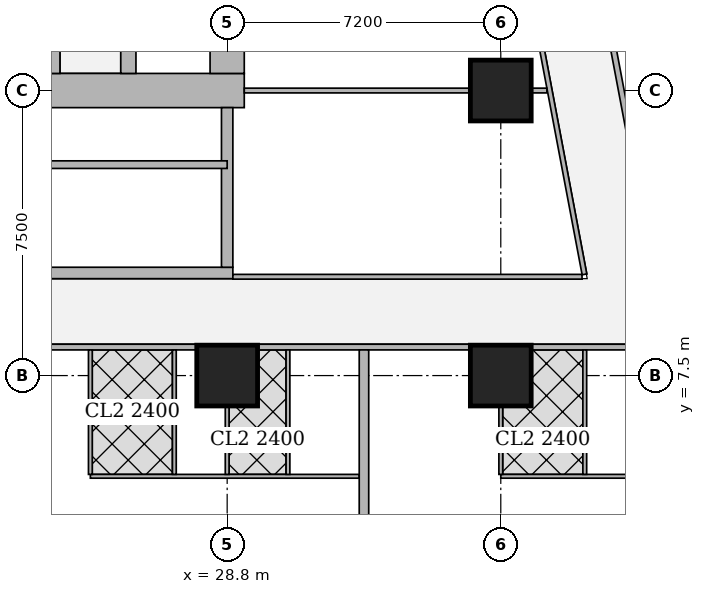
"""IFC4 building model, lengths in metres.
Left out: names, types, materials, properties, quantities, classifications, styles, units other than length and angle.
Written with IfcOpenShell. Run it as: python <this file> out.ifc"""

import sys

from ifc_helpers import new_model, si_unit, direction, frame, frame_2d, origin, origin_2d, place, context, subcontext, project, spatial, rectangle, extrude, element, fill, save


model = new_model("IFC4")
c1 = context("Model", 3, precision=1e-05, world=origin(), true_north=direction((0.0, 1.0)))
c2 = subcontext(c1, "Body", "Model", "MODEL_VIEW")
j1 = project(units=[si_unit("LENGTHUNIT", "METRE"), si_unit("PLANEANGLEUNIT", "RADIAN")], contexts=[c1])
p1 = place(None, origin())
s1 = spatial("IfcSite", under=j1, at=p1, CompositionType="ELEMENT")
p2 = place(p1, origin())
s2 = spatial("IfcBuilding", under=s1, at=p2, CompositionType="ELEMENT")
p3 = place(p2, frame((0.0, 0.0, 100.4)))
s3 = spatial("IfcBuildingStorey", under=s2, at=p3, CompositionType="ELEMENT", Elevation=100.4)
for number, where, z_axis, x_axis in (
    (1, (28.8, 7.5, 0.0), (0.0, 0.0, 1.0), (1.0, 0.0, 0.0)),
    (2, (36.0, 7.5, 0.0), (0.0, 0.0, 1.0), (1.0, 0.0, 0.0)),
    (3, (36.0, 15.0, 0.0), (0.0, 0.0, 1.0), (1.0, 0.0, 0.0)),
):
    element("IfcColumn", number, at=place(p3, frame(where, z_axis=z_axis, x_axis=x_axis)), inside=s3, PredefinedType="COLUMN", context=c2, shape_type="SweptSolid", body=[
        extrude(rectangle(XDim=1.6, YDim=1.6, at=origin_2d()), origin(), (0.0, 0.0, 1.0), 3.75),
    ])
p4 = place(p3, frame((13.95, 15.0, 0.0), z_axis=(0.0, 0.0, 1.0), x_axis=(1.0, 0.0, 0.0)))
e4 = element("IfcWall", 4, at=p4, inside=s3, PredefinedType="SHEAR", context=c2, shape_type="SweptSolid", body=[
    extrude(rectangle(XDim=15.3, YDim=0.9, at=frame_2d((7.65, 0.0))), origin(), (0.0, 0.0, 1.0), 3.75),
])
p5 = place(p4, frame((4.45, 0.0, 0.0)))
e5 = element("IfcOpeningElement", 5, at=p5, cuts=e4, PredefinedType="OPENING", context=c2, shape_type="SweptSolid", body=[
    extrude(rectangle(XDim=1.8, YDim=2.1, at=frame_2d((0.9, 1.05))), frame((0.0, 0.46, 0.0), z_axis=(0.0, -1.0, 0.0), x_axis=(1.0, 0.0, 0.0)), (0.0, 0.0, 1.0), 0.92),
])
p6 = place(p4, frame((10.7, 0.0, 0.0)))
e6 = element("IfcOpeningElement", 6, at=p6, cuts=e4, PredefinedType="OPENING", context=c2, shape_type="SweptSolid", body=[
    extrude(rectangle(XDim=1.1, YDim=2.1, at=frame_2d((0.55, 1.05))), frame((0.0, 0.46, 0.0), z_axis=(0.0, -1.0, 0.0), x_axis=(1.0, 0.0, 0.0)), (0.0, 0.0, 1.0), 0.92),
])
p7 = place(p3, frame((28.8, 15.45, 0.0), z_axis=(0.0, 0.0, 1.0), x_axis=(0.0, 1.0, 0.0)))
e7 = element("IfcWall", 7, at=p7, inside=s3, PredefinedType="SHEAR", context=c2, shape_type="SweptSolid", body=[
    extrude(rectangle(XDim=14.1, YDim=0.9, at=frame_2d((7.05, 0.0))), origin(), (0.0, 0.0, 1.0), 3.75),
])
p8 = place(p3, frame((24.2, 15.45, 0.0), z_axis=(0.0, 0.0, 1.0), x_axis=(0.0, 1.0, 0.0)))
e8 = element("IfcWall", 8, at=p8, inside=s3, PredefinedType="SHEAR", context=c2, shape_type="SweptSolid", body=[
    extrude(rectangle(XDim=14.1, YDim=0.4, at=frame_2d((7.05, 0.0))), origin(), (0.0, 0.0, 1.0), 3.75),
])
p9 = place(p3, frame((26.2, 15.45, 0.0), z_axis=(0.0, 0.0, 1.0), x_axis=(0.0, 1.0, 0.0)))
e9 = element("IfcWall", 9, at=p9, inside=s3, PredefinedType="SHEAR", context=c2, shape_type="SweptSolid", body=[
    extrude(rectangle(XDim=3.1, YDim=0.4, at=frame_2d((1.55, 0.0))), origin(), (0.0, 0.0, 1.0), 3.75),
])
p10 = place(p9, frame((0.825, 0.0, 0.0)))
e10 = element("IfcOpeningElement", 10, at=p10, cuts=e9, PredefinedType="OPENING", context=c2, shape_type="SweptSolid", body=[
    extrude(rectangle(XDim=1.2, YDim=2.1, at=frame_2d((0.6, 1.05))), frame((0.0, 0.21, 0.0), z_axis=(0.0, -1.0, 0.0), x_axis=(1.0, 0.0, 0.0)), (0.0, 0.0, 1.0), 0.42),
])
p11 = place(p3, frame((21.45, 10.2, 0.0), z_axis=(0.0, 0.0, 1.0), x_axis=(1.0, 0.0, 0.0)))
e11 = element("IfcWall", 11, at=p11, inside=s3, PredefinedType="SHEAR", context=c2, shape_type="SweptSolid", body=[
    extrude(rectangle(XDim=7.5, YDim=0.3, at=frame_2d((3.75, 0.0))), origin(), (0.0, 0.0, 1.0), 3.75),
])
p12 = place(p11, frame((0.5, 0.0, 0.0)))
e12 = element("IfcOpeningElement", 12, at=p12, cuts=e11, PredefinedType="OPENING", context=c2, shape_type="SweptSolid", body=[
    extrude(rectangle(XDim=1.1, YDim=2.1, at=frame_2d((0.55, 1.05))), frame((0.0, 0.16, 0.0), z_axis=(0.0, -1.0, 0.0), x_axis=(1.0, 0.0, 0.0)), (0.0, 0.0, 1.0), 0.32),
])
p13 = place(p3, frame((28.8, 10.35, 0.0), z_axis=(0.0, 0.0, 1.0), x_axis=(0.0, 1.0, 0.0)))
e13 = element("IfcWall", 13, at=p13, inside=s3, PredefinedType="SHEAR", context=c2, shape_type="SweptSolid", body=[
    extrude(rectangle(XDim=4.2, YDim=0.3, at=frame_2d((2.1, 0.0))), origin(), (0.0, 0.0, 1.0), 3.75),
])
p14 = place(p3, frame((40.356, 8.25, 0.0), z_axis=(0.0, 0.0, 1.0), x_axis=(-1.0, 0.0, 0.0)))
e14 = element("IfcWall", 14, at=p14, inside=s3, PredefinedType="SOLIDWALL", context=c2, shape_type="SweptSolid", body=[
    extrude(rectangle(XDim=3.555, YDim=0.15, at=frame_2d((1.777, 0.0))), origin(), (0.0, 0.0, 1.0), 3.5),
])
p15 = place(p3, frame((35.199, 8.25, 0.0), z_axis=(0.0, 0.0, 1.0), x_axis=(-1.0, 0.0, 0.0)))
e15 = element("IfcWall", 15, at=p15, inside=s3, PredefinedType="SOLIDWALL", context=c2, shape_type="SweptSolid", body=[
    extrude(rectangle(XDim=5.598, YDim=0.15, at=frame_2d((2.799, 0.0))), origin(), (0.0, 0.0, 1.0), 3.5),
])
p16 = place(p15, frame((0.699, 0.0, 0.0)))
e16 = element("IfcOpeningElement", 16, at=p16, cuts=e15, PredefinedType="OPENING", context=c2, shape_type="SweptSolid", body=[
    extrude(rectangle(XDim=1.0, YDim=2.1, at=frame_2d((0.5, 1.05))), frame((0.0, 0.085, 0.0), z_axis=(0.0, -1.0, 0.0), x_axis=(1.0, 0.0, 0.0)), (0.0, 0.0, 1.0), 0.17),
])
p17 = place(p3, frame((27.999, 8.25, 0.0), z_axis=(0.0, 0.0, 1.0), x_axis=(-1.0, 0.0, 0.0)))
e17 = element("IfcWall", 17, at=p17, inside=s3, PredefinedType="SOLIDWALL", context=c2, shape_type="SweptSolid", body=[
    extrude(rectangle(XDim=5.598, YDim=0.15, at=frame_2d((2.799, 0.0))), origin(), (0.0, 0.0, 1.0), 3.5),
])
p18 = place(p17, frame((3.899, 0.0, 0.0)))
e18 = element("IfcOpeningElement", 18, at=p18, cuts=e17, PredefinedType="OPENING", context=c2, shape_type="SweptSolid", body=[
    extrude(rectangle(XDim=1.0, YDim=2.1, at=frame_2d((0.5, 1.05))), frame((0.0, 0.085, 0.0), z_axis=(0.0, -1.0, 0.0), x_axis=(1.0, 0.0, 0.0)), (0.0, 0.0, 1.0), 0.17),
])
p19 = place(p3, frame((33.382, 45.65, 0.0), z_axis=(0.0, 0.0, 1.0), x_axis=(0.185593544777, -0.982626600565, 0.0)))
e19 = element("IfcWall", 19, at=p19, inside=s3, PredefinedType="SOLIDWALL", context=c2, shape_type="SweptSolid", body=[
    extrude(rectangle(XDim=47.118, YDim=0.15, at=frame_2d((23.559, 0.0))), origin(), (0.0, 0.0, 1.0), 2.2),
])
p20 = place(p19, frame((10.662, 0.0, 0.0)))
e20 = element("IfcOpeningElement", 20, at=p20, cuts=e19, PredefinedType="OPENING", context=c2, shape_type="SweptSolid", body=[
    extrude(rectangle(XDim=1.0, YDim=2.1, at=frame_2d((0.5, 1.05))), frame((0.0, 0.085, 0.0), z_axis=(0.0, -1.0, 0.0), x_axis=(1.0, 0.0, 0.0)), (0.0, 0.0, 1.0), 0.17),
])
p21 = place(p19, frame((15.237, 0.0, 0.0)))
e21 = element("IfcOpeningElement", 21, at=p21, cuts=e19, PredefinedType="OPENING", context=c2, shape_type="SweptSolid", body=[
    extrude(rectangle(XDim=1.0, YDim=2.1, at=frame_2d((0.5, 1.05))), frame((0.0, 0.085, 0.0), z_axis=(0.0, -1.0, 0.0), x_axis=(1.0, 0.0, 0.0)), (0.0, 0.0, 1.0), 0.17),
])
p22 = place(p19, frame((27.341, 0.0, 0.0)))
e22 = element("IfcOpeningElement", 22, at=p22, cuts=e19, PredefinedType="OPENING", context=c2, shape_type="SweptSolid", body=[
    extrude(rectangle(XDim=1.0, YDim=2.1, at=frame_2d((0.5, 1.05))), frame((0.0, 0.085, 0.0), z_axis=(0.0, -1.0, 0.0), x_axis=(1.0, 0.0, 0.0)), (0.0, 0.0, 1.0), 0.17),
])
p23 = place(p19, frame((33.833, 0.0, 0.0)))
e23 = element("IfcOpeningElement", 23, at=p23, cuts=e19, PredefinedType="OPENING", context=c2, shape_type="SweptSolid", body=[
    extrude(rectangle(XDim=1.0, YDim=2.1, at=frame_2d((0.5, 1.05))), frame((0.0, 0.085, 0.0), z_axis=(0.0, -1.0, 0.0), x_axis=(1.0, 0.0, 0.0)), (0.0, 0.0, 1.0), 0.17),
])
p24 = place(p3, frame((32.275, 4.85, 0.0), z_axis=(0.0, 0.0, 1.0), x_axis=(-1.0, 0.0, 0.0)))
e24 = element("IfcWall", 24, at=p24, inside=s3, PredefinedType="PARTITIONING", context=c2, shape_type="SweptSolid", body=[
    extrude(rectangle(XDim=7.075, YDim=0.1, at=frame_2d((3.538, 0.0))), origin(), (0.0, 0.0, 1.0), 3.5),
])
p25 = place(p24, frame((5.52, 0.0, 0.0)))
e25 = element("IfcOpeningElement", 25, at=p25, cuts=e24, PredefinedType="OPENING", context=c2, shape_type="SweptSolid", body=[
    extrude(rectangle(XDim=0.9, YDim=2.1, at=frame_2d((0.45, 1.05))), frame((0.0, 0.06, 0.0), z_axis=(0.0, -1.0, 0.0), x_axis=(1.0, 0.0, 0.0)), (0.0, 0.0, 1.0), 0.12),
])
p26 = place(p24, frame((2.225, 0.0, 0.0)))
e26 = element("IfcOpeningElement", 26, at=p26, cuts=e24, PredefinedType="OPENING", context=c2, shape_type="SweptSolid", body=[
    extrude(rectangle(XDim=0.9, YDim=2.1, at=frame_2d((0.45, 1.05))), frame((0.0, 0.06, 0.0), z_axis=(0.0, -1.0, 0.0), x_axis=(1.0, 0.0, 0.0)), (0.0, 0.0, 1.0), 0.12),
])
p27 = place(p24, frame((3.72, 0.0, 0.0)))
e27 = element("IfcOpeningElement", 27, at=p27, cuts=e24, PredefinedType="OPENING", context=c2, shape_type="SweptSolid", body=[
    extrude(rectangle(XDim=0.9, YDim=2.1, at=frame_2d((0.45, 1.05))), frame((0.0, 0.06, 0.0), z_axis=(0.0, -1.0, 0.0), x_axis=(1.0, 0.0, 0.0)), (0.0, 0.0, 1.0), 0.12),
])
p28 = place(p24, frame((0.425, 0.0, 0.0)))
e28 = element("IfcOpeningElement", 28, at=p28, cuts=e24, PredefinedType="OPENING", context=c2, shape_type="SweptSolid", body=[
    extrude(rectangle(XDim=0.9, YDim=2.1, at=frame_2d((0.45, 1.05))), frame((0.0, 0.06, 0.0), z_axis=(0.0, -1.0, 0.0), x_axis=(1.0, 0.0, 0.0)), (0.0, 0.0, 1.0), 0.12),
])
p29 = place(p3, frame((25.2, 4.9, 0.0), z_axis=(0.0, 0.0, 1.0), x_axis=(0.0, 1.0, 0.0)))
e29 = element("IfcWall", 29, at=p29, inside=s3, PredefinedType="PARTITIONING", context=c2, shape_type="SweptSolid", body=[
    extrude(rectangle(XDim=3.275, YDim=0.1, at=frame_2d((1.638, 0.0))), origin(), (0.0, 0.0, 1.0), 3.5),
])
p30 = place(p3, frame((28.8, 4.9, 0.0), z_axis=(0.0, 0.0, 1.0), x_axis=(0.0, 1.0, 0.0)))
e30 = element("IfcWall", 30, at=p30, inside=s3, PredefinedType="PARTITIONING", context=c2, shape_type="SweptSolid", body=[
    extrude(rectangle(XDim=1.799, YDim=0.1, at=frame_2d((0.899, 0.0))), origin(), (0.0, 0.0, 1.0), 3.5),
])
for number, where, z_axis, x_axis in (
    (31, (27.41, 4.9, 0.0), (0.0, 0.0, 1.0), (0.0, 1.0, 0.0)),
    (32, (30.4, 4.9, 0.0), (0.0, 0.0, 1.0), (0.0, 1.0, 0.0)),
):
    element("IfcWall", number, at=place(p3, frame(where, z_axis=z_axis, x_axis=x_axis)), inside=s3, PredefinedType="PARTITIONING", context=c2, shape_type="SweptSolid", body=[
        extrude(rectangle(XDim=3.275, YDim=0.1, at=frame_2d((1.638, 0.0))), origin(), (0.0, 0.0, 1.0), 3.5),
    ])
p31 = place(p3, frame((41.002, 4.85, 0.0), z_axis=(0.0, 0.0, 1.0), x_axis=(-1.0, 0.0, 0.0)))
e33 = element("IfcWall", 33, at=p31, inside=s3, PredefinedType="PARTITIONING", context=c2, shape_type="SweptSolid", body=[
    extrude(rectangle(XDim=5.002, YDim=0.1, at=frame_2d((2.501, 0.0))), origin(), (0.0, 0.0, 1.0), 3.5),
])
p32 = place(p31, frame((3.447, 0.0, 0.0)))
e34 = element("IfcOpeningElement", 34, at=p32, cuts=e33, PredefinedType="OPENING", context=c2, shape_type="SweptSolid", body=[
    extrude(rectangle(XDim=0.9, YDim=2.1, at=frame_2d((0.45, 1.05))), frame((0.0, 0.06, 0.0), z_axis=(0.0, -1.0, 0.0), x_axis=(1.0, 0.0, 0.0)), (0.0, 0.0, 1.0), 0.12),
])
p33 = place(p31, frame((0.15, 0.0, 0.0)))
e35 = element("IfcOpeningElement", 35, at=p33, cuts=e33, PredefinedType="OPENING", context=c2, shape_type="SweptSolid", body=[
    extrude(rectangle(XDim=0.9, YDim=2.1, at=frame_2d((0.45, 1.05))), frame((0.0, 0.06, 0.0), z_axis=(0.0, -1.0, 0.0), x_axis=(1.0, 0.0, 0.0)), (0.0, 0.0, 1.0), 0.12),
])
p34 = place(p31, frame((1.647, 0.0, 0.0)))
e36 = element("IfcOpeningElement", 36, at=p34, cuts=e33, PredefinedType="OPENING", context=c2, shape_type="SweptSolid", body=[
    extrude(rectangle(XDim=0.9, YDim=2.1, at=frame_2d((0.45, 1.05))), frame((0.0, 0.06, 0.0), z_axis=(0.0, -1.0, 0.0), x_axis=(1.0, 0.0, 0.0)), (0.0, 0.0, 1.0), 0.12),
])
p35 = place(p3, frame((36.0, 4.9, 0.0), z_axis=(0.0, 0.0, 1.0), x_axis=(0.0, 1.0, 0.0)))
e37 = element("IfcWall", 37, at=p35, inside=s3, PredefinedType="PARTITIONING", context=c2, shape_type="SweptSolid", body=[
    extrude(rectangle(XDim=1.799, YDim=0.1, at=frame_2d((0.899, 0.0))), origin(), (0.0, 0.0, 1.0), 3.5),
])
p36 = place(p3, frame((38.21, 4.9, 0.0), z_axis=(0.0, 0.0, 1.0), x_axis=(0.0, 1.0, 0.0)))
e38 = element("IfcWall", 38, at=p36, inside=s3, PredefinedType="PARTITIONING", context=c2, shape_type="SweptSolid", body=[
    extrude(rectangle(XDim=3.275, YDim=0.1, at=frame_2d((1.638, 0.0))), origin(), (0.0, 0.0, 1.0), 3.5),
])
p37 = place(p3, frame((32.4, 3.65, 0.0), z_axis=(0.0, 0.0, 1.0), x_axis=(0.0, 1.0, 0.0)))
e39 = element("IfcWall", 39, at=p37, inside=s3, PredefinedType="SOLIDWALL", context=c2, shape_type="SweptSolid", body=[
    extrude(rectangle(XDim=4.525, YDim=0.25, at=frame_2d((2.263, 0.0))), origin(), (0.0, 0.0, 1.0), 3.5),
])
p38 = place(p3, frame((28.95, 10.1, 0.0), z_axis=(0.0, 0.0, 1.0), x_axis=(1.0, 0.0, 0.0)))
e40 = element("IfcWall", 40, at=p38, inside=s3, PredefinedType="PARTITIONING", context=c2, shape_type="SweptSolid", body=[
    extrude(rectangle(XDim=9.188, YDim=0.125, at=frame_2d((4.594, 0.0))), origin(), (0.0, 0.0, 1.0), 3.5),
])
p39 = place(p3, frame((38.202, 10.163, 0.0), z_axis=(0.0, 0.0, 1.0), x_axis=(-0.185610321132, 0.982623431783, 0.0)))
e41 = element("IfcWall", 41, at=p39, inside=s3, PredefinedType="PARTITIONING", context=c2, shape_type="SweptSolid", body=[
    extrude(rectangle(XDim=25.111, YDim=0.125, at=frame_2d((12.556, 0.0))), origin(), (0.0, 0.0, 1.0), 2.5),
])
p40 = place(p39, frame((0.708, 0.0, 0.0)))
e42 = element("IfcOpeningElement", 42, at=p40, cuts=e41, PredefinedType="OPENING", context=c2, shape_type="SweptSolid", body=[
    extrude(rectangle(XDim=1.0, YDim=2.1, at=frame_2d((0.5, 1.05))), frame((0.0, 0.073, 0.0), z_axis=(0.0, -1.0, 0.0), x_axis=(1.0, 0.0, 0.0)), (0.0, 0.0, 1.0), 0.145),
])
p41 = place(p39, frame((6.0, 0.0, 0.0)))
e43 = element("IfcOpeningElement", 43, at=p41, cuts=e41, PredefinedType="OPENING", context=c2, shape_type="SweptSolid", body=[
    extrude(rectangle(XDim=1.0, YDim=2.1, at=frame_2d((0.5, 1.05))), frame((0.0, 0.073, 0.0), z_axis=(0.0, -1.0, 0.0), x_axis=(1.0, 0.0, 0.0)), (0.0, 0.0, 1.0), 0.145),
])
p42 = place(p39, frame((13.378, 0.0, 0.0)))
e44 = element("IfcOpeningElement", 44, at=p42, cuts=e41, PredefinedType="OPENING", context=c2, shape_type="SweptSolid", body=[
    extrude(rectangle(XDim=1.0, YDim=2.1, at=frame_2d((0.5, 1.05))), frame((0.0, 0.073, 0.0), z_axis=(0.0, -1.0, 0.0), x_axis=(1.0, 0.0, 0.0)), (0.0, 0.0, 1.0), 0.145),
])
p43 = place(p39, frame((21.25, 0.0, 0.0)))
e45 = element("IfcOpeningElement", 45, at=p43, cuts=e41, PredefinedType="OPENING", context=c2, shape_type="SweptSolid", body=[
    extrude(rectangle(XDim=1.0, YDim=2.1, at=frame_2d((0.5, 1.05))), frame((0.0, 0.073, 0.0), z_axis=(0.0, -1.0, 0.0), x_axis=(1.0, 0.0, 0.0)), (0.0, 0.0, 1.0), 0.145),
])
p44 = place(p3, frame((29.25, 15.0, 0.0), z_axis=(0.0, 0.0, 1.0), x_axis=(1.0, 0.0, 0.0)))
e46 = element("IfcWall", 46, at=p44, inside=s3, PredefinedType="PARTITIONING", context=c2, shape_type="SweptSolid", body=[
    extrude(rectangle(XDim=5.949, YDim=0.125, at=frame_2d((2.975, 0.0))), origin(), (0.0, 0.0, 1.0), 3.5),
])
p45 = place(p3, frame((36.801, 15.0, 0.0), z_axis=(0.0, 0.0, 1.0), x_axis=(1.0, 0.0, 0.0)))
e47 = element("IfcWall", 47, at=p45, inside=s3, PredefinedType="PARTITIONING", context=c2, shape_type="SweptSolid", body=[
    extrude(rectangle(XDim=0.412, YDim=0.125, at=frame_2d((0.206, 0.0))), origin(), (0.0, 0.0, 1.0), 3.5),
])
p46 = place(p3, frame((23.0, 13.05, 0.0), z_axis=(0.0, 0.0, 1.0), x_axis=(1.0, 0.0, 0.0)))
e48 = element("IfcWall", 48, at=p46, inside=s3, PredefinedType="SHEAR", context=c2, shape_type="SweptSolid", body=[
    extrude(rectangle(XDim=5.8, YDim=0.2, at=frame_2d((2.9, 0.0))), origin(), (0.0, 0.0, 1.0), 3.75),
])
p47 = place(p25, origin())
e49 = element("IfcDoor", 49, at=p47, inside=s3, OperationType="SINGLE_SWING_LEFT", PredefinedType="DOOR", context=c2, shape_type="SweptSolid", body=[
    extrude(rectangle(XDim=0.9, YDim=2.1, at=frame_2d((0.45, 1.05))), frame((0.0, 0.025, 0.0), z_axis=(0.0, -1.0, 0.0), x_axis=(1.0, 0.0, 0.0)), (0.0, 0.0, 1.0), 0.05),
])
fill(e25, e49)
p48 = place(p26, origin())
e50 = element("IfcDoor", 50, at=p48, inside=s3, OperationType="SINGLE_SWING_RIGHT", PredefinedType="DOOR", context=c2, shape_type="SweptSolid", body=[
    extrude(rectangle(XDim=0.9, YDim=2.1, at=frame_2d((0.45, 1.05))), frame((0.0, 0.025, 0.0), z_axis=(0.0, -1.0, 0.0), x_axis=(1.0, 0.0, 0.0)), (0.0, 0.0, 1.0), 0.05),
])
fill(e26, e50)
p49 = place(p27, origin())
e51 = element("IfcDoor", 51, at=p49, inside=s3, OperationType="SINGLE_SWING_RIGHT", PredefinedType="DOOR", context=c2, shape_type="SweptSolid", body=[
    extrude(rectangle(XDim=0.9, YDim=2.1, at=frame_2d((0.45, 1.05))), frame((0.0, 0.025, 0.0), z_axis=(0.0, -1.0, 0.0), x_axis=(1.0, 0.0, 0.0)), (0.0, 0.0, 1.0), 0.05),
])
fill(e27, e51)
p50 = place(p28, origin())
e52 = element("IfcDoor", 52, at=p50, inside=s3, OperationType="SINGLE_SWING_RIGHT", PredefinedType="DOOR", context=c2, shape_type="SweptSolid", body=[
    extrude(rectangle(XDim=0.9, YDim=2.1, at=frame_2d((0.45, 1.05))), frame((0.0, 0.025, 0.0), z_axis=(0.0, -1.0, 0.0), x_axis=(1.0, 0.0, 0.0)), (0.0, 0.0, 1.0), 0.05),
])
fill(e28, e52)
p51 = place(p32, origin())
e53 = element("IfcDoor", 53, at=p51, inside=s3, OperationType="SINGLE_SWING_LEFT", PredefinedType="DOOR", context=c2, shape_type="SweptSolid", body=[
    extrude(rectangle(XDim=0.9, YDim=2.1, at=frame_2d((0.45, 1.05))), frame((0.0, 0.025, 0.0), z_axis=(0.0, -1.0, 0.0), x_axis=(1.0, 0.0, 0.0)), (0.0, 0.0, 1.0), 0.05),
])
fill(e34, e53)
p52 = place(p34, origin())
e54 = element("IfcDoor", 54, at=p52, inside=s3, OperationType="SINGLE_SWING_LEFT", PredefinedType="DOOR", context=c2, shape_type="SweptSolid", body=[
    extrude(rectangle(XDim=0.9, YDim=2.1, at=frame_2d((0.45, 1.05))), frame((0.0, 0.025, 0.0), z_axis=(0.0, -1.0, 0.0), x_axis=(1.0, 0.0, 0.0)), (0.0, 0.0, 1.0), 0.05),
])
fill(e36, e54)
p53 = place(p16, origin())
e55 = element("IfcDoor", 55, at=p53, inside=s3, OperationType="SINGLE_SWING_LEFT", PredefinedType="DOOR", context=c2, shape_type="SweptSolid", body=[
    extrude(rectangle(XDim=1.0, YDim=2.1, at=frame_2d((0.5, 1.05))), frame((0.0, 0.025, 0.0), z_axis=(0.0, -1.0, 0.0), x_axis=(1.0, 0.0, 0.0)), (0.0, 0.0, 1.0), 0.05),
])
fill(e16, e55)
p54 = place(p40, origin())
e56 = element("IfcDoor", 56, at=p54, inside=s3, OperationType="SINGLE_SWING_LEFT", PredefinedType="DOOR", context=c2, shape_type="SweptSolid", body=[
    extrude(rectangle(XDim=1.0, YDim=2.1, at=frame_2d((0.5, 1.05))), frame((0.0, 0.025, 0.0), z_axis=(0.0, -1.0, 0.0), x_axis=(1.0, 0.0, 0.0)), (0.0, 0.0, 1.0), 0.05),
])
fill(e42, e56)
p55 = place(p6, origin())
e57 = element("IfcDoor", 57, at=p55, inside=s3, OperationType="SINGLE_SWING_LEFT", PredefinedType="DOOR", context=c2, shape_type="SweptSolid", body=[
    extrude(rectangle(XDim=1.1, YDim=2.1, at=frame_2d((0.55, 1.05))), frame((0.0, 0.025, 0.0), z_axis=(0.0, -1.0, 0.0), x_axis=(1.0, 0.0, 0.0)), (0.0, 0.0, 1.0), 0.05),
])
fill(e6, e57)
save(model, sys.argv[1])
